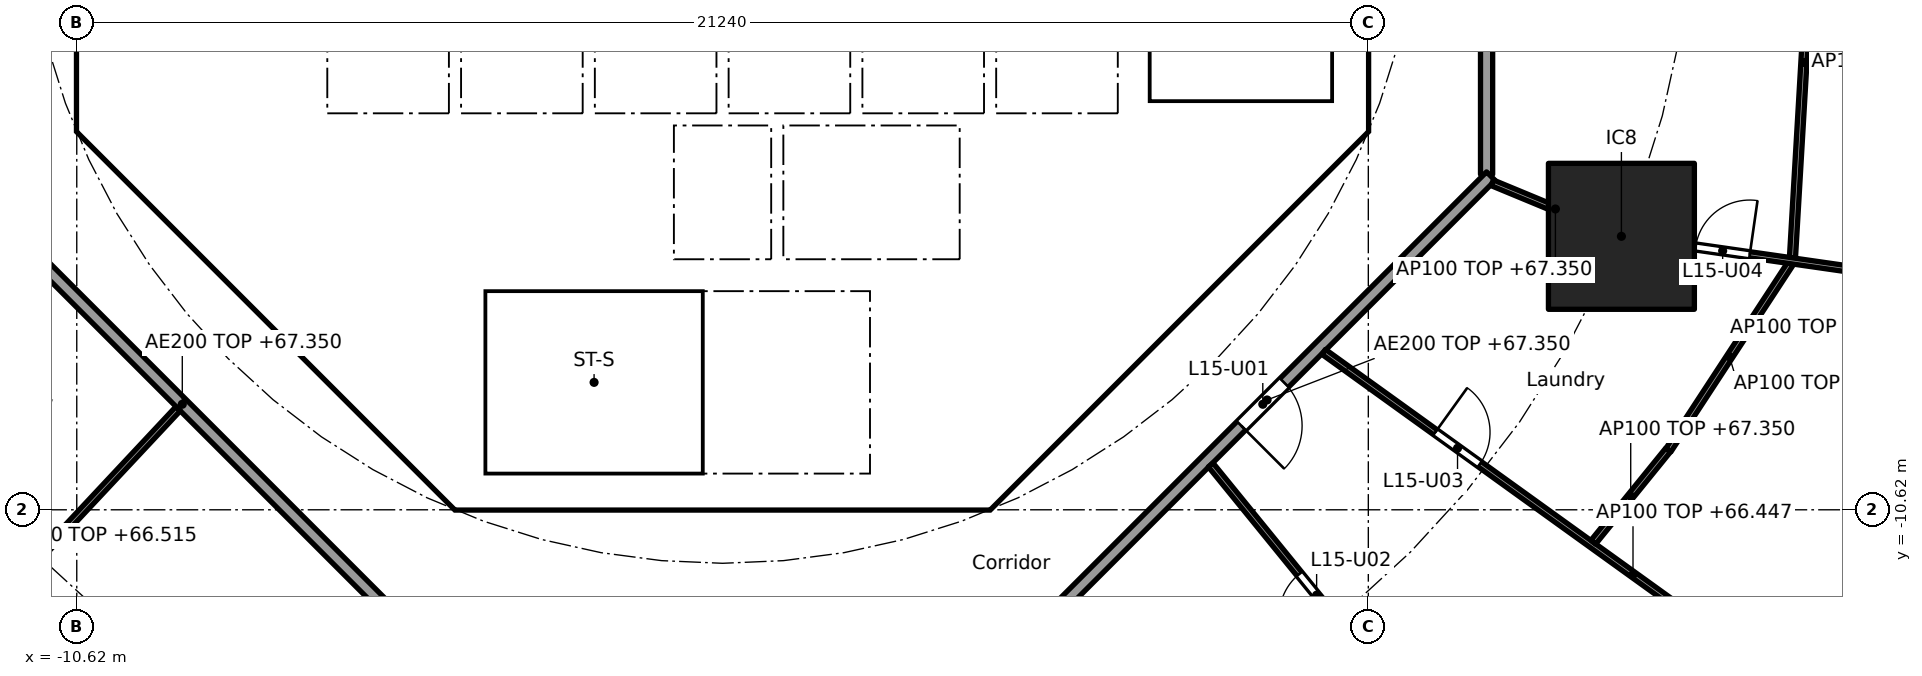
"""IFC4 building model, lengths in metres.
Left out: names, types, materials, properties, quantities, classifications, styles, units other than length and angle.
Written with IfcOpenShell. Run it as: python <this file> out.ifc"""

import sys

from ifc_helpers import new_model, si_unit, direction, frame, frame_2d, origin, origin_2d, place, context, subcontext, project, spatial, polyline, rectangle, outline, extrude, element, fill, save


model = new_model("IFC4")
c1 = context("Model", 3, precision=1e-05, world=origin(), true_north=direction((0.0, 1.0)))
c2 = subcontext(c1, "Body", "Model", "MODEL_VIEW")
j1 = project(units=[si_unit("LENGTHUNIT", "METRE"), si_unit("PLANEANGLEUNIT", "RADIAN")], contexts=[c1])
p1 = place(None, origin())
s1 = spatial("IfcSite", under=j1, at=p1, CompositionType="ELEMENT")
p2 = place(p1, origin())
s2 = spatial("IfcBuilding", under=s1, at=p2, CompositionType="ELEMENT")
p3 = place(p2, frame((0.0, 0.0, 64.0)))
s3 = spatial("IfcBuildingStorey", under=s2, at=p3, CompositionType="ELEMENT", Elevation=64.0)
p4 = place(p3, frame((14.782, -6.123, 0.0), z_axis=(0.0, 0.0, 1.0), x_axis=(1.0, 0.0, 0.0)))
e1 = element("IfcColumn", 1, at=p4, inside=s3, PredefinedType="COLUMN", context=c2, shape_type="SweptSolid", body=[
    extrude(rectangle(XDim=2.4, YDim=2.4, at=origin_2d()), origin(), (0.0, 0.0, 1.0), 3.7),
])
p5 = place(p3, frame((-10.325, 3.801, 0.0), z_axis=(0.0, 0.0, 1.0), x_axis=(0.0, -1.0, 0.0)))
e2 = element("IfcWall", 2, at=p5, inside=s3, PredefinedType="SHEAR", context=c2, shape_type="SweptSolid", body=[
    extrude(rectangle(XDim=7.602, YDim=0.6, at=frame_2d((3.801, 0.0))), origin(), (0.0, 0.0, 1.0), 3.35),
])
p6 = place(p5, frame((0.651, 0.0, 0.0)))
e3 = element("IfcOpeningElement", 3, at=p6, cuts=e2, PredefinedType="OPENING", context=c2, shape_type="SweptSolid", body=[
    extrude(rectangle(XDim=1.5, YDim=2.1, at=frame_2d((0.75, 1.05))), frame((0.0, 0.31, 0.0), z_axis=(0.0, -1.0, 0.0), x_axis=(1.0, 0.0, 0.0)), (0.0, 0.0, 1.0), 0.62),
])
p7 = place(p5, frame((5.451, 0.0, 0.0)))
e4 = element("IfcOpeningElement", 4, at=p7, cuts=e2, PredefinedType="OPENING", context=c2, shape_type="SweptSolid", body=[
    extrude(rectangle(XDim=1.5, YDim=2.1, at=frame_2d((0.75, 1.05))), frame((0.0, 0.31, 0.0), z_axis=(0.0, -1.0, 0.0), x_axis=(1.0, 0.0, 0.0)), (0.0, 0.0, 1.0), 0.62),
])
p8 = place(p3, frame((-9.988, -4.613, 0.0), z_axis=(0.0, 0.0, 1.0), x_axis=(0.707106781187, -0.707106781187, 0.0)))
e5 = element("IfcWall", 5, at=p8, inside=s3, PredefinedType="SHEAR", context=c2, shape_type="SweptSolid", body=[
    extrude(rectangle(XDim=7.602, YDim=0.6, at=frame_2d((3.801, 0.0))), origin(), (0.0, 0.0, 1.0), 3.35),
])
p9 = place(p8, frame((6.151, 0.0, 0.0)))
e6 = element("IfcOpeningElement", 6, at=p9, cuts=e5, PredefinedType="OPENING", context=c2, shape_type="SweptSolid", body=[
    extrude(rectangle(XDim=1.1, YDim=2.1, at=frame_2d((0.55, 1.05))), frame((0.0, 0.31, 0.0), z_axis=(0.0, -1.0, 0.0), x_axis=(1.0, 0.0, 0.0)), (0.0, 0.0, 1.0), 0.62),
])
p10 = place(p3, frame((4.613, -9.988, 0.0), z_axis=(0.0, 0.0, 1.0), x_axis=(0.707106781187, 0.707106781187, 0.0)))
e7 = element("IfcWall", 7, at=p10, inside=s3, PredefinedType="SHEAR", context=c2, shape_type="SweptSolid", body=[
    extrude(rectangle(XDim=7.602, YDim=0.6, at=frame_2d((3.801, 0.0))), origin(), (0.0, 0.0, 1.0), 3.35),
])
p11 = place(p10, frame((3.201, 0.0, 0.0)))
e8 = element("IfcOpeningElement", 8, at=p11, cuts=e7, PredefinedType="OPENING", context=c2, shape_type="SweptSolid", body=[
    extrude(rectangle(XDim=1.2, YDim=2.1, at=frame_2d((0.6, 1.05))), frame((0.0, 0.31, 0.0), z_axis=(0.0, -1.0, 0.0), x_axis=(1.0, 0.0, 0.0)), (0.0, 0.0, 1.0), 0.62),
])
p12 = place(p3, frame((4.0, -10.025, 0.0), z_axis=(0.0, 0.0, 1.0), x_axis=(0.0, 1.0, 0.0)))
e9 = element("IfcWall", 9, at=p12, inside=s3, PredefinedType="SOLIDWALL", context=c2, shape_type="SweptSolid", body=[
    extrude(rectangle(XDim=3.0, YDim=0.2, at=frame_2d((1.5, 0.0))), origin(), (0.0, 0.0, 1.0), 3.35),
])
p13 = place(p12, frame((0.975, 0.0, 0.0)))
e10 = element("IfcOpeningElement", 10, at=p13, cuts=e9, PredefinedType="OPENING", context=c2, shape_type="SweptSolid", body=[
    extrude(rectangle(XDim=1.1, YDim=2.1, at=frame_2d((0.55, 1.05))), frame((0.0, 0.11, 0.0), z_axis=(0.0, -1.0, 0.0), x_axis=(1.0, 0.0, 0.0)), (0.0, 0.0, 1.0), 0.22),
])
p14 = place(p3, frame((-7.4, -6.627, 0.0), z_axis=(0.0, 0.0, 1.0), x_axis=(0.0, 1.0, 0.0)))
e11 = element("IfcWall", 11, at=p14, inside=s3, PredefinedType="PARTITIONING", context=c2, shape_type="SweptSolid", body=[
    extrude(rectangle(XDim=2.527, YDim=0.15, at=frame_2d((1.263, 0.0))), origin(), (0.0, 0.0, 1.0), 3.35),
])
p15 = place(p14, frame((0.776, 0.0, 0.0)))
e12 = element("IfcOpeningElement", 12, at=p15, cuts=e11, PredefinedType="OPENING", context=c2, shape_type="SweptSolid", body=[
    extrude(rectangle(XDim=0.9, YDim=2.1, at=frame_2d((0.45, 1.05))), frame((0.0, 0.085, 0.0), z_axis=(0.0, -1.0, 0.0), x_axis=(1.0, 0.0, 0.0)), (0.0, 0.0, 1.0), 0.17),
])
p16 = place(p3, frame((4.0, -6.5, 0.0), z_axis=(0.0, 0.0, 1.0), x_axis=(0.0, 1.0, 0.0)))
e13 = element("IfcWall", 13, at=p16, inside=s3, PredefinedType="SOLIDWALL", context=c2, shape_type="SweptSolid", body=[
    extrude(rectangle(XDim=2.2, YDim=0.2, at=frame_2d((1.1, 0.0))), origin(), (0.0, 0.0, 1.0), 3.35),
])
p17 = place(p16, frame((0.55, 0.0, 0.0)))
e14 = element("IfcOpeningElement", 14, at=p17, cuts=e13, PredefinedType="OPENING", context=c2, shape_type="SweptSolid", body=[
    extrude(rectangle(XDim=1.1, YDim=2.1, at=frame_2d((0.55, 1.05))), frame((0.0, 0.11, 0.0), z_axis=(0.0, -1.0, 0.0), x_axis=(1.0, 0.0, 0.0)), (0.0, 0.0, 1.0), 0.22),
])
p18 = place(p3, frame((-4.0, -6.5, 0.0), z_axis=(0.0, 0.0, 1.0), x_axis=(0.0, 1.0, 0.0)))
e15 = element("IfcWall", 15, at=p18, inside=s3, PredefinedType="SOLIDWALL", context=c2, shape_type="SweptSolid", body=[
    extrude(rectangle(XDim=2.2, YDim=0.2, at=frame_2d((1.1, 0.0))), origin(), (0.0, 0.0, 1.0), 3.35),
])
p19 = place(p18, frame((0.65, 0.0, 0.0)))
e16 = element("IfcOpeningElement", 16, at=p19, cuts=e15, PredefinedType="OPENING", context=c2, shape_type="SweptSolid", body=[
    extrude(rectangle(XDim=0.9, YDim=2.1, at=frame_2d((0.45, 1.05))), frame((0.0, 0.11, 0.0), z_axis=(0.0, -1.0, 0.0), x_axis=(1.0, 0.0, 0.0)), (0.0, 0.0, 1.0), 0.22),
])
p20 = place(p3, origin())
e17 = element("IfcWall", 17, at=p20, inside=s3, PredefinedType="SHEAR", context=c2, shape_type="SweptSolid", body=[
    extrude(outline(polyline([(-10.625, -3.801), (-10.025, -3.801), (-10.025, -4.152), (-9.776, -4.401), (-10.2, -4.825), (-10.625, -4.401), (-10.625, -3.801)])), origin(), (0.0, 0.0, 1.0), 3.35),
])
p21 = place(p3, origin())
e18 = element("IfcWall", 18, at=p21, inside=s3, PredefinedType="SHEAR", context=c2, shape_type="SweptSolid", body=[
    extrude(outline(polyline([(-4.152, -10.025), (4.152, -10.025), (4.401, -9.776), (4.825, -10.2), (4.401, -10.625), (-4.401, -10.625), (-4.825, -10.2), (-4.401, -9.776), (-4.152, -10.025)])), origin(), (0.0, 0.0, 1.0), 3.35),
])
p22 = place(p3, origin())
e19 = element("IfcWall", 19, at=p22, inside=s3, PredefinedType="SHEAR", context=c2, shape_type="SweptSolid", body=[
    extrude(outline(polyline([(9.776, -4.401), (10.025, -4.152), (10.025, -3.801), (10.025, 4.152), (9.776, 4.401), (10.2, 4.825), (10.625, 4.401), (10.625, -4.401), (10.2, -4.825), (9.776, -4.401)])), origin(), (0.0, 0.0, 1.0), 3.35),
])
p23 = place(p3, frame((-10.025, -4.0, 0.0), z_axis=(0.0, 0.0, 1.0), x_axis=(1.0, 0.0, 0.0)))
e20 = element("IfcWall", 20, at=p23, inside=s3, PredefinedType="PARTITIONING", context=c2, shape_type="SweptSolid", body=[
    extrude(rectangle(XDim=3.325, YDim=0.2, at=frame_2d((1.662, 0.0))), origin(), (0.0, 0.0, 1.0), 3.35),
])
for number, where, z_axis, x_axis in (
    (21, (-0.9, -6.5, 0.0), (0.0, 0.0, 1.0), (0.0, 1.0, 0.0)),
    (22, (0.9, -6.5, 0.0), (0.0, 0.0, 1.0), (0.0, 1.0, 0.0)),
):
    element("IfcWall", number, at=place(p3, frame(where, z_axis=z_axis, x_axis=x_axis)), inside=s3, PredefinedType="SOLIDWALL", context=c2, shape_type="SweptSolid", body=[
        extrude(rectangle(XDim=2.2, YDim=0.2, at=frame_2d((1.1, 0.0))), origin(), (0.0, 0.0, 1.0), 3.35),
    ])
p24 = place(p3, origin())
e23 = element("IfcWall", 23, at=p24, inside=s3, PredefinedType="SOLIDWALL", context=c2, shape_type="SweptSolid", body=[
    extrude(outline(polyline([(-6.7, -2.1), (-6.5, -2.1), (-6.5, -4.1), (-4.5, -4.1), (-4.5, -2.1), (-4.3, -2.1), (-4.3, -4.1), (-2.3, -4.1), (-2.3, -2.1), (-2.1, -2.1), (-2.1, -4.1), (-0.1, -4.1), (-0.1, -2.1), (0.1, -2.1), (0.1, -4.1), (2.1, -4.1), (2.1, -2.1), (2.3, -2.1), (2.3, -4.1), (4.3, -4.1), (4.3, -2.1), (4.5, -2.1), (4.5, -4.1), (6.5, -4.1), (6.5, -2.1), (6.7, -2.1), (6.7, -4.3), (-6.7, -4.3), (-6.7, -2.1)])), origin(), (0.0, 0.0, 1.0), 3.35),
])
p25 = place(p3, origin())
e24 = element("IfcWall", 24, at=p25, inside=s3, PredefinedType="SOLIDWALL", context=c2, shape_type="SweptSolid", body=[
    extrude(outline(polyline([(-3.9, -10.025), (-4.1, -10.025), (-4.1, -7.025), (-3.9, -7.025), (-3.9, -10.025)])), origin(), (0.0, 0.0, 1.0), 3.35),
])
p26 = place(p3, origin())
e25 = element("IfcWall", 25, at=p26, inside=s3, PredefinedType="SOLIDWALL", context=c2, shape_type="SweptSolid", body=[
    extrude(outline(polyline([(4.1, -7.025), (-4.1, -7.025), (-4.1, -6.5), (4.1, -6.5), (4.1, -7.025)])), origin(), (0.0, 0.0, 1.0), 3.35),
])
p27 = place(p3, origin())
e26 = element("IfcWall", 26, at=p27, inside=s3, PredefinedType="SOLIDWALL", context=c2, shape_type="SweptSolid", body=[
    extrude(outline(polyline([(7.025, -3.9), (6.7, -3.9), (6.7, 3.9), (7.025, 3.9), (7.025, -3.9)])), origin(), (0.0, 0.0, 1.0), 3.35),
])
p28 = place(p3, origin())
e27 = element("IfcWall", 27, at=p28, inside=s3, PredefinedType="SOLIDWALL", context=c2, shape_type="SweptSolid", body=[
    extrude(outline(polyline([(10.025, -4.1), (6.7, -4.1), (6.7, -3.9), (10.025, -3.9), (10.025, -4.1)])), origin(), (0.0, 0.0, 1.0), 3.35),
])
p29 = place(p3, frame((12.565, -5.104, 0.0), z_axis=(0.0, 0.0, 1.0), x_axis=(0.0, 1.0, 0.0)))
e28 = element("IfcWall", 28, at=p29, inside=s3, PredefinedType="PARTITIONING", context=c2, shape_type="SweptSolid", body=[
    extrude(rectangle(XDim=10.209, YDim=0.2, at=frame_2d((5.104, 0.0))), origin(), (0.0, 0.0, 1.0), 3.35),
])
p30 = place(p3, frame((-12.635, -5.134, 0.0), z_axis=(0.0, 0.0, 1.0), x_axis=(0.707106781187, -0.707106781187, 0.0)))
e29 = element("IfcWall", 29, at=p30, inside=s3, PredefinedType="PARTITIONING", context=c2, shape_type="SweptSolid", body=[
    extrude(rectangle(XDim=10.609, YDim=0.2, at=frame_2d((5.305, 0.0))), origin(), (0.0, 0.0, 1.0), 3.35),
])
p31 = place(p3, frame((5.275, -12.494, 0.0), z_axis=(0.0, 0.0, 1.0), x_axis=(0.707106781187, 0.707106781187, 0.0)))
e30 = element("IfcWall", 30, at=p31, inside=s3, PredefinedType="PARTITIONING", context=c2, shape_type="SweptSolid", body=[
    extrude(rectangle(XDim=10.409, YDim=0.2, at=frame_2d((5.205, 0.0))), origin(), (0.0, 0.0, 1.0), 3.35),
])
p32 = place(p31, frame((4.604, 0.0, 0.0)))
e31 = element("IfcOpeningElement", 31, at=p32, cuts=e30, PredefinedType="OPENING", context=c2, shape_type="SweptSolid", body=[
    extrude(rectangle(XDim=1.0, YDim=2.1, at=frame_2d((0.5, 1.05))), frame((0.0, 0.11, 0.0), z_axis=(0.0, -1.0, 0.0), x_axis=(1.0, 0.0, 0.0)), (0.0, 0.0, 1.0), 0.22),
])
p33 = place(p3, frame((17.971, -0.05, 0.0), z_axis=(0.0, 0.0, 1.0), x_axis=(-0.058475267553, -0.998288857538, 0.0)))
e32 = element("IfcWall", 32, at=p33, inside=s3, PredefinedType="PARTITIONING", context=c2, shape_type="SweptSolid", body=[
    extrude(rectangle(XDim=6.438, YDim=0.1, at=frame_2d((3.219, 0.0))), origin(), (0.0, 0.0, 1.0), 2.515),
])
p34 = place(p3, frame((-13.222, -10.007, 0.0), z_axis=(0.0, 0.0, 1.0), x_axis=(0.64083455704, -0.767679015282, 0.0)))
e33 = element("IfcWall", 33, at=p34, inside=s3, PredefinedType="PARTITIONING", context=c2, shape_type="SweptSolid", body=[
    extrude(rectangle(XDim=4.837, YDim=0.1, at=frame_2d((2.418, 0.0))), origin(), (0.0, 0.0, 1.0), 2.515),
])
p35 = place(p3, frame((-8.953, -8.958, 0.0), z_axis=(0.0, 0.0, 1.0), x_axis=(-0.683322485948, -0.730116689439, 0.0)))
e34 = element("IfcWall", 34, at=p35, inside=s3, PredefinedType="PARTITIONING", context=c2, shape_type="SweptSolid", body=[
    extrude(rectangle(XDim=9.219, YDim=0.1, at=frame_2d((4.609, 0.0))), origin(), (0.0, 0.0, 1.0), 2.447),
])
p36 = place(p35, frame((6.149, 0.0, 0.0)))
e35 = element("IfcOpeningElement", 35, at=p36, cuts=e34, PredefinedType="OPENING", context=c2, shape_type="SweptSolid", body=[
    extrude(rectangle(XDim=0.9, YDim=2.1, at=frame_2d((0.45, 1.05))), frame((0.0, 0.06, 0.0), z_axis=(0.0, -1.0, 0.0), x_axis=(1.0, 0.0, 0.0)), (0.0, 0.0, 1.0), 0.12),
])
p37 = place(p3, frame((8.028, -9.882, 0.0), z_axis=(0.0, 0.0, 1.0), x_axis=(0.631035554955, -0.77575390968, 0.0)))
e36 = element("IfcWall", 36, at=p37, inside=s3, PredefinedType="PARTITIONING", context=c2, shape_type="SweptSolid", body=[
    extrude(rectangle(XDim=12.759, YDim=0.1, at=frame_2d((6.379, 0.0))), origin(), (0.0, 0.0, 1.0), 2.447),
])
p38 = place(p37, frame((2.311, 0.0, 0.0)))
e37 = element("IfcOpeningElement", 37, at=p38, cuts=e36, PredefinedType="OPENING", context=c2, shape_type="SweptSolid", body=[
    extrude(rectangle(XDim=0.9, YDim=2.1, at=frame_2d((0.45, 1.05))), frame((0.0, 0.06, 0.0), z_axis=(0.0, -1.0, 0.0), x_axis=(1.0, 0.0, 0.0)), (0.0, 0.0, 1.0), 0.12),
])
p39 = place(p37, frame((8.69, 0.0, 0.0)))
e38 = element("IfcOpeningElement", 38, at=p39, cuts=e36, PredefinedType="OPENING", context=c2, shape_type="SweptSolid", body=[
    extrude(rectangle(XDim=0.9, YDim=2.1, at=frame_2d((0.45, 1.05))), frame((0.0, 0.06, 0.0), z_axis=(0.0, -1.0, 0.0), x_axis=(1.0, 0.0, 0.0)), (0.0, 0.0, 1.0), 0.12),
])
p40 = place(p3, frame((9.886, -8.023, 0.0), z_axis=(0.0, 0.0, 1.0), x_axis=(0.811615973871, -0.58419133078, 0.0)))
e39 = element("IfcWall", 39, at=p40, inside=s3, PredefinedType="PARTITIONING", context=c2, shape_type="SweptSolid", body=[
    extrude(rectangle(XDim=12.535, YDim=0.1, at=frame_2d((6.268, 0.0))), origin(), (0.0, 0.0, 1.0), 2.447),
])
p41 = place(p40, frame((2.262, 0.0, 0.0)))
e40 = element("IfcOpeningElement", 40, at=p41, cuts=e39, PredefinedType="OPENING", context=c2, shape_type="SweptSolid", body=[
    extrude(rectangle(XDim=0.9, YDim=2.1, at=frame_2d((0.45, 1.05))), frame((0.0, 0.06, 0.0), z_axis=(0.0, -1.0, 0.0), x_axis=(1.0, 0.0, 0.0)), (0.0, 0.0, 1.0), 0.12),
])
p42 = place(p40, frame((8.53, 0.0, 0.0)))
e41 = element("IfcOpeningElement", 41, at=p42, cuts=e39, PredefinedType="OPENING", context=c2, shape_type="SweptSolid", body=[
    extrude(rectangle(XDim=0.9, YDim=2.1, at=frame_2d((0.45, 1.05))), frame((0.0, 0.06, 0.0), z_axis=(0.0, -1.0, 0.0), x_axis=(1.0, 0.0, 0.0)), (0.0, 0.0, 1.0), 0.12),
])
p43 = place(p3, frame((14.32, -11.153, 0.0), z_axis=(0.0, 0.0, 1.0), x_axis=(0.63006076661, 0.776545832761, 0.0)))
e42 = element("IfcWall", 42, at=p43, inside=s3, PredefinedType="PARTITIONING", context=c2, shape_type="SweptSolid", body=[
    extrude(rectangle(XDim=1.953, YDim=0.1, at=frame_2d((0.977, 0.0))), origin(), (0.0, 0.0, 1.0), 3.35),
])
p44 = place(p3, frame((15.555, -9.639, 0.0), z_axis=(0.0, 0.0, 1.0), x_axis=(0.547618530423, 0.836728119007, 0.0)))
e43 = element("IfcWall", 43, at=p44, inside=s3, PredefinedType="PARTITIONING", context=c2, shape_type="SweptSolid", body=[
    extrude(rectangle(XDim=3.67, YDim=0.1, at=frame_2d((1.835, 0.0))), origin(), (0.0, 0.0, 1.0), 2.515),
])
p45 = place(p3, frame((12.657, -5.243, 0.0), z_axis=(0.0, 0.0, 1.0), x_axis=(0.923864733477, -0.382719158442, 0.0)))
e44 = element("IfcWall", 44, at=p45, inside=s3, PredefinedType="PARTITIONING", context=c2, shape_type="SweptSolid", body=[
    extrude(rectangle(XDim=2.25, YDim=0.1, at=frame_2d((1.125, 0.0))), origin(), (0.0, 0.0, 1.0), 3.35),
])
p46 = place(p3, frame((14.832, -6.13, 0.0), z_axis=(0.0, 0.0, 1.0), x_axis=(0.989837122016, -0.142205737856, 0.0)))
e45 = element("IfcWall", 45, at=p46, inside=s3, PredefinedType="PARTITIONING", context=c2, shape_type="SweptSolid", body=[
    extrude(rectangle(XDim=9.63, YDim=0.1, at=frame_2d((4.815, 0.0))), origin(), (0.0, 0.0, 1.0), 3.35),
])
p47 = place(p46, frame((1.182, 0.0, 0.0)))
e46 = element("IfcOpeningElement", 46, at=p47, cuts=e45, PredefinedType="OPENING", context=c2, shape_type="SweptSolid", body=[
    extrude(rectangle(XDim=0.9, YDim=2.1, at=frame_2d((0.45, 1.05))), frame((0.0, 0.06, 0.0), z_axis=(0.0, -1.0, 0.0), x_axis=(1.0, 0.0, 0.0)), (0.0, 0.0, 1.0), 0.12),
])
p48 = place(p46, frame((5.734, 0.0, 0.0)))
e47 = element("IfcOpeningElement", 47, at=p48, cuts=e45, PredefinedType="OPENING", context=c2, shape_type="SweptSolid", body=[
    extrude(rectangle(XDim=0.9, YDim=2.1, at=frame_2d((0.45, 1.05))), frame((0.0, 0.06, 0.0), z_axis=(0.0, -1.0, 0.0), x_axis=(1.0, 0.0, 0.0)), (0.0, 0.0, 1.0), 0.12),
])
p49 = place(p17, origin())
e48 = element("IfcDoor", 48, at=p49, inside=s3, OperationType="DOUBLE_DOOR_SLIDING", PredefinedType="DOOR", context=c2, shape_type="SweptSolid", body=[
    extrude(rectangle(XDim=1.1, YDim=2.1, at=frame_2d((0.55, 1.05))), frame((0.0, 0.025, 0.0), z_axis=(0.0, -1.0, 0.0), x_axis=(1.0, 0.0, 0.0)), (0.0, 0.0, 1.0), 0.05),
])
fill(e14, e48)
p50 = place(p13, origin())
e49 = element("IfcDoor", 49, at=p50, inside=s3, OperationType="SINGLE_SWING_LEFT", PredefinedType="DOOR", context=c2, shape_type="SweptSolid", body=[
    extrude(rectangle(XDim=1.1, YDim=2.1, at=frame_2d((0.55, 1.05))), frame((0.0, 0.025, 0.0), z_axis=(0.0, -1.0, 0.0), x_axis=(1.0, 0.0, 0.0)), (0.0, 0.0, 1.0), 0.05),
])
fill(e10, e49)
p51 = place(p15, origin())
e50 = element("IfcDoor", 50, at=p51, inside=s3, OperationType="SINGLE_SWING_LEFT", PredefinedType="DOOR", context=c2, shape_type="SweptSolid", body=[
    extrude(rectangle(XDim=0.9, YDim=2.1, at=frame_2d((0.45, 1.05))), frame((0.0, 0.025, 0.0), z_axis=(0.0, -1.0, 0.0), x_axis=(1.0, 0.0, 0.0)), (0.0, 0.0, 1.0), 0.05),
])
fill(e12, e50)
p52 = place(p19, frame((0.9, 0.0, 0.0), x_axis=(-1.0, 0.0, 0.0)))
e51 = element("IfcDoor", 51, at=p52, inside=s3, OperationType="SINGLE_SWING_RIGHT", PredefinedType="DOOR", context=c2, shape_type="SweptSolid", body=[
    extrude(rectangle(XDim=0.9, YDim=2.1, at=frame_2d((0.45, 1.05))), frame((0.0, 0.025, 0.0), z_axis=(0.0, -1.0, 0.0), x_axis=(1.0, 0.0, 0.0)), (0.0, 0.0, 1.0), 0.05),
])
fill(e16, e51)
p53 = place(p11, origin())
e52 = element("IfcDoor", 52, at=p53, inside=s3, OperationType="SINGLE_SWING_RIGHT", PredefinedType="DOOR", context=c2, shape_type="SweptSolid", body=[
    extrude(rectangle(XDim=1.2, YDim=2.1, at=frame_2d((0.6, 1.05))), frame((0.0, 0.025, 0.0), z_axis=(0.0, -1.0, 0.0), x_axis=(1.0, 0.0, 0.0)), (0.0, 0.0, 1.0), 0.05),
])
fill(e8, e52)
p54 = place(p7, origin())
e53 = element("IfcDoor", 53, at=p54, inside=s3, OperationType="DOUBLE_DOOR_SINGLE_SWING", PredefinedType="DOOR", context=c2, shape_type="SweptSolid", body=[
    extrude(rectangle(XDim=1.5, YDim=2.1, at=frame_2d((0.75, 1.05))), frame((0.0, 0.025, 0.0), z_axis=(0.0, -1.0, 0.0), x_axis=(1.0, 0.0, 0.0)), (0.0, 0.0, 1.0), 0.05),
])
fill(e4, e53)
p55 = place(p9, origin())
e54 = element("IfcDoor", 54, at=p55, inside=s3, OperationType="SINGLE_SWING_RIGHT", PredefinedType="DOOR", context=c2, shape_type="SweptSolid", body=[
    extrude(rectangle(XDim=1.1, YDim=2.1, at=frame_2d((0.55, 1.05))), frame((0.0, 0.025, 0.0), z_axis=(0.0, -1.0, 0.0), x_axis=(1.0, 0.0, 0.0)), (0.0, 0.0, 1.0), 0.05),
])
fill(e6, e54)
p56 = place(p32, frame((1.0, 0.0, 0.0), x_axis=(-1.0, 0.0, 0.0)))
e55 = element("IfcDoor", 55, at=p56, inside=s3, OperationType="SINGLE_SWING_RIGHT", PredefinedType="DOOR", context=c2, shape_type="SweptSolid", body=[
    extrude(rectangle(XDim=1.0, YDim=2.1, at=frame_2d((0.5, 1.05))), frame((0.0, 0.025, 0.0), z_axis=(0.0, -1.0, 0.0), x_axis=(1.0, 0.0, 0.0)), (0.0, 0.0, 1.0), 0.05),
])
fill(e31, e55)
p57 = place(p38, frame((0.9, 0.0, 0.0), x_axis=(-1.0, 0.0, 0.0)))
e56 = element("IfcDoor", 56, at=p57, inside=s3, OperationType="SINGLE_SWING_LEFT", PredefinedType="DOOR", context=c2, shape_type="SweptSolid", body=[
    extrude(rectangle(XDim=0.9, YDim=2.1, at=frame_2d((0.45, 1.05))), frame((0.0, 0.025, 0.0), z_axis=(0.0, -1.0, 0.0), x_axis=(1.0, 0.0, 0.0)), (0.0, 0.0, 1.0), 0.05),
])
fill(e37, e56)
p58 = place(p41, origin())
e57 = element("IfcDoor", 57, at=p58, inside=s3, OperationType="SINGLE_SWING_LEFT", PredefinedType="DOOR", context=c2, shape_type="SweptSolid", body=[
    extrude(rectangle(XDim=0.9, YDim=2.1, at=frame_2d((0.45, 1.05))), frame((0.0, 0.025, 0.0), z_axis=(0.0, -1.0, 0.0), x_axis=(1.0, 0.0, 0.0)), (0.0, 0.0, 1.0), 0.05),
])
fill(e40, e57)
p59 = place(p47, origin())
e58 = element("IfcDoor", 58, at=p59, inside=s3, OperationType="SINGLE_SWING_RIGHT", PredefinedType="DOOR", context=c2, shape_type="SweptSolid", body=[
    extrude(rectangle(XDim=0.9, YDim=2.1, at=frame_2d((0.45, 1.05))), frame((0.0, 0.025, 0.0), z_axis=(0.0, -1.0, 0.0), x_axis=(1.0, 0.0, 0.0)), (0.0, 0.0, 1.0), 0.05),
])
fill(e46, e58)
save(model, sys.argv[1])
